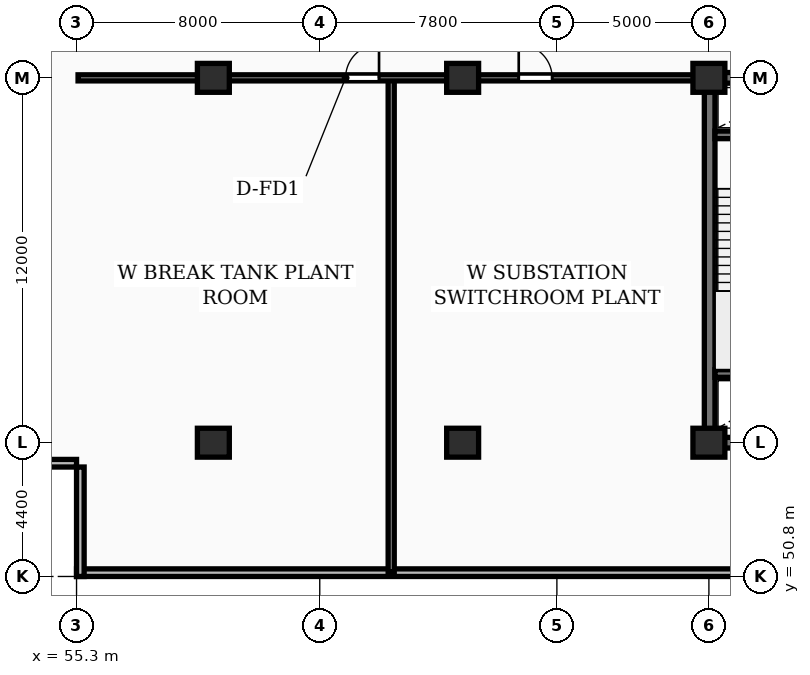
"""IFC4 building model, lengths in metres.
Left out: names, types, materials, properties, quantities, classifications, styles, units other than length and angle.
Written with IfcOpenShell. Run it as: python <this file> out.ifc"""

import sys

from ifc_helpers import new_model, si_unit, direction, frame, frame_2d, origin, origin_2d, place, context, subcontext, project, spatial, rectangle, extrude, element, fill, save


model = new_model("IFC4")
c1 = context("Model", 3, precision=1e-05, world=origin(), true_north=direction((0.0, 1.0)))
c2 = subcontext(c1, "Body", "Model", "MODEL_VIEW")
j1 = project(units=[si_unit("LENGTHUNIT", "METRE"), si_unit("PLANEANGLEUNIT", "RADIAN")], contexts=[c1])
p1 = place(None, origin())
s1 = spatial("IfcSite", under=j1, at=p1, CompositionType="ELEMENT")
p2 = place(p1, origin())
s2 = spatial("IfcBuilding", under=s1, at=p2, CompositionType="ELEMENT")
p3 = place(p2, frame((0.0, 0.0, 76.0)))
s3 = spatial("IfcBuildingStorey", under=s2, at=p3, CompositionType="ELEMENT", Elevation=76.0)
for number, where, z_axis, x_axis in (
    (1, (59.8, 55.2, 0.0), (0.0, 0.0, 1.0), (1.0, 0.0, 0.0)),
    (2, (59.8, 67.2, 0.0), (0.0, 0.0, 1.0), (1.0, 0.0, 0.0)),
    (3, (68.0, 55.2, 0.0), (0.0, 0.0, 1.0), (1.0, 0.0, 0.0)),
    (4, (68.0, 67.2, 0.0), (0.0, 0.0, 1.0), (1.0, 0.0, 0.0)),
    (5, (76.1, 55.2, 0.0), (0.0, 0.0, 1.0), (1.0, 0.0, 0.0)),
    (6, (76.1, 67.2, 0.0), (0.0, 0.0, 1.0), (1.0, 0.0, 0.0)),
):
    element("IfcColumn", number, at=place(p3, frame(where, z_axis=z_axis, x_axis=x_axis)), inside=s3, PredefinedType="COLUMN", context=c2, shape_type="SweptSolid", body=[
        extrude(rectangle(XDim=1.05, YDim=0.95, at=origin_2d()), origin(), (0.0, 0.0, 1.0), 4.8),
    ])
p4 = place(p3, frame((55.3, 50.925, 0.0), z_axis=(0.0, 0.0, 1.0), x_axis=(1.0, 0.0, 0.0)))
e7 = element("IfcWall", 7, at=p4, inside=s3, PredefinedType="SHEAR", context=c2, shape_type="SweptSolid", body=[
    extrude(rectangle(XDim=77.6, YDim=0.25, at=frame_2d((38.8, 0.0))), origin(), (0.0, 0.0, 1.0), 4.48),
])
p5 = place(p3, frame((51.7, 54.525, 0.0), z_axis=(0.0, 0.0, 1.0), x_axis=(1.0, 0.0, 0.0)))
e8 = element("IfcWall", 8, at=p5, inside=s3, PredefinedType="SHEAR", context=c2, shape_type="SweptSolid", body=[
    extrude(rectangle(XDim=3.6, YDim=0.25, at=frame_2d((1.8, 0.0))), origin(), (0.0, 0.0, 1.0), 4.48),
])
p6 = place(p3, frame((55.425, 54.4, 0.0), z_axis=(0.0, 0.0, 1.0), x_axis=(0.0, -1.0, 0.0)))
e9 = element("IfcWall", 9, at=p6, inside=s3, PredefinedType="SHEAR", context=c2, shape_type="SweptSolid", body=[
    extrude(rectangle(XDim=3.6, YDim=0.25, at=frame_2d((1.8, 0.0))), origin(), (0.0, 0.0, 1.0), 4.48),
])
p7 = place(p3, frame((75.95, 55.2, 0.0), z_axis=(0.0, 0.0, 1.0), x_axis=(1.0, 0.0, 0.0)))
e10 = element("IfcWall", 10, at=p7, inside=s3, PredefinedType="SHEAR", context=c2, shape_type="SweptSolid", body=[
    extrude(rectangle(XDim=36.3, YDim=0.35, at=frame_2d((18.15, 0.0))), origin(), (0.0, 0.0, 1.0), 4.8),
])
p8 = place(p3, frame((76.125, 55.375, 0.0), z_axis=(0.0, 0.0, 1.0), x_axis=(0.0, 1.0, 0.0)))
e11 = element("IfcWall", 11, at=p8, inside=s3, PredefinedType="SHEAR", context=c2, shape_type="SweptSolid", body=[
    extrude(rectangle(XDim=11.65, YDim=0.35, at=frame_2d((5.825, 0.0))), origin(), (0.0, 0.0, 1.0), 4.8),
])
p9 = place(p3, frame((75.95, 67.2, 0.0), z_axis=(0.0, 0.0, 1.0), x_axis=(1.0, 0.0, 0.0)))
e12 = element("IfcWall", 12, at=p9, inside=s3, PredefinedType="SHEAR", context=c2, shape_type="SweptSolid", body=[
    extrude(rectangle(XDim=36.3, YDim=0.35, at=frame_2d((18.15, 0.0))), origin(), (0.0, 0.0, 1.0), 4.8),
])
p10 = place(p9, frame((5.25, 0.0, 0.0)))
e13 = element("IfcOpeningElement", 13, at=p10, cuts=e12, PredefinedType="OPENING", context=c2, shape_type="SweptSolid", body=[
    extrude(rectangle(XDim=1.0, YDim=2.15, at=frame_2d((0.5, 1.075))), frame((0.0, 0.185, 0.0), z_axis=(0.0, -1.0, 0.0), x_axis=(1.0, 0.0, 0.0)), (0.0, 0.0, 1.0), 0.37),
])
p11 = place(p9, frame((21.6, 0.0, 0.0)))
e14 = element("IfcOpeningElement", 14, at=p11, cuts=e12, PredefinedType="OPENING", context=c2, shape_type="SweptSolid", body=[
    extrude(rectangle(XDim=1.5, YDim=2.2, at=frame_2d((0.75, 1.1))), frame((0.0, 0.185, 0.0), z_axis=(0.0, -1.0, 0.0), x_axis=(1.0, 0.0, 0.0)), (0.0, 0.0, 1.0), 0.37),
])
p12 = place(p9, frame((30.45, 0.0, 0.0)))
e15 = element("IfcOpeningElement", 15, at=p12, cuts=e12, PredefinedType="OPENING", context=c2, shape_type="SweptSolid", body=[
    extrude(rectangle(XDim=1.0, YDim=2.15, at=frame_2d((0.5, 1.075))), frame((0.0, 0.185, 0.0), z_axis=(0.0, -1.0, 0.0), x_axis=(1.0, 0.0, 0.0)), (0.0, 0.0, 1.0), 0.37),
])
for number, where, z_axis, x_axis in (
    (16, (76.3, 57.475, 0.0), (0.0, 0.0, 1.0), (1.0, 0.0, 0.0)),
    (17, (76.3, 65.325, 0.0), (0.0, 0.0, 1.0), (1.0, 0.0, 0.0)),
):
    element("IfcWall", number, at=place(p3, frame(where, z_axis=z_axis, x_axis=x_axis)), inside=s3, PredefinedType="SHEAR", context=c2, shape_type="SweptSolid", body=[
        extrude(rectangle(XDim=3.24, YDim=0.25, at=frame_2d((1.62, 0.0))), origin(), (0.0, 0.0, 1.0), 4.8),
    ])
p13 = place(p3, frame((65.65, 50.95, 0.0), z_axis=(0.0, 0.0, 1.0), x_axis=(0.0, 1.0, 0.0)))
e18 = element("IfcWall", 18, at=p13, inside=s3, PredefinedType="PARTITIONING", context=c2, shape_type="SweptSolid", body=[
    extrude(rectangle(XDim=16.2, YDim=0.2, at=frame_2d((8.1, 0.0))), origin(), (0.0, 0.0, 1.0), 4.48),
])
p14 = place(p3, frame((55.35, 67.2, 0.0), z_axis=(0.0, 0.0, 1.0), x_axis=(1.0, 0.0, 0.0)))
e19 = element("IfcWall", 19, at=p14, inside=s3, PredefinedType="PARTITIONING", context=c2, shape_type="SweptSolid", body=[
    extrude(rectangle(XDim=20.6, YDim=0.2, at=frame_2d((10.3, 0.0))), origin(), (0.0, 0.0, 1.0), 3.23),
])
p15 = place(p14, frame((8.8, 0.0, 0.0)))
e20 = element("IfcOpeningElement", 20, at=p15, cuts=e19, PredefinedType="OPENING", context=c2, shape_type="SweptSolid", body=[
    extrude(rectangle(XDim=1.1, YDim=2.1, at=frame_2d((0.55, 1.05))), frame((0.0, 0.11, 0.0), z_axis=(0.0, -1.0, 0.0), x_axis=(1.0, 0.0, 0.0)), (0.0, 0.0, 1.0), 0.22),
])
p16 = place(p14, frame((14.495, 0.0, 0.0)))
e21 = element("IfcOpeningElement", 21, at=p16, cuts=e19, PredefinedType="OPENING", context=c2, shape_type="SweptSolid", body=[
    extrude(rectangle(XDim=1.1, YDim=2.1, at=frame_2d((0.55, 1.05))), frame((0.0, 0.11, 0.0), z_axis=(0.0, -1.0, 0.0), x_axis=(1.0, 0.0, 0.0)), (0.0, 0.0, 1.0), 0.22),
])
p17 = place(p15, origin())
e22 = element("IfcDoor", 22, at=p17, inside=s3, OperationType="SINGLE_SWING_RIGHT", PredefinedType="DOOR", context=c2, shape_type="SweptSolid", body=[
    extrude(rectangle(XDim=1.1, YDim=2.1, at=frame_2d((0.55, 1.05))), frame((0.0, 0.025, 0.0), z_axis=(0.0, -1.0, 0.0), x_axis=(1.0, 0.0, 0.0)), (0.0, 0.0, 1.0), 0.05),
])
fill(e20, e22)
p18 = place(p16, origin())
e23 = element("IfcDoor", 23, at=p18, inside=s3, OperationType="SINGLE_SWING_LEFT", PredefinedType="DOOR", context=c2, shape_type="SweptSolid", body=[
    extrude(rectangle(XDim=1.1, YDim=2.1, at=frame_2d((0.55, 1.05))), frame((0.0, 0.025, 0.0), z_axis=(0.0, -1.0, 0.0), x_axis=(1.0, 0.0, 0.0)), (0.0, 0.0, 1.0), 0.05),
])
fill(e21, e23)
save(model, sys.argv[1])
